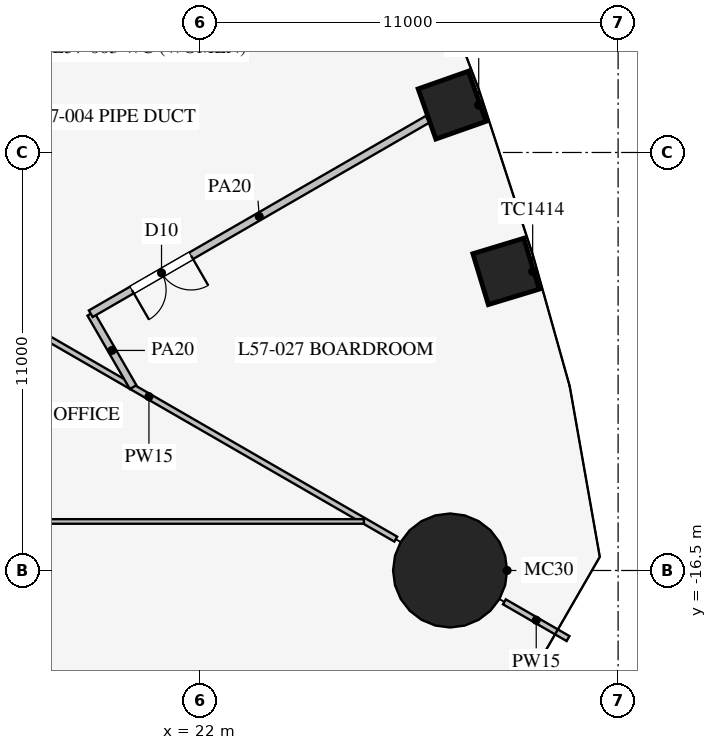
"""IFC4 building model, lengths in metres.
Left out: names, types, materials, properties, quantities, classifications, styles, units other than length and angle.
Written with IfcOpenShell. Run it as: python <this file> out.ifc"""

import sys

from ifc_helpers import new_model, si_unit, direction, frame, frame_2d, origin, origin_2d, place, context, subcontext, project, spatial, rectangle, circle, extrude, element, fill, save


model = new_model("IFC4")
c1 = context("Model", 3, precision=1e-05, world=origin(), true_north=direction((0.0, 1.0)))
c2 = subcontext(c1, "Body", "Model", "MODEL_VIEW")
j1 = project(units=[si_unit("LENGTHUNIT", "METRE"), si_unit("PLANEANGLEUNIT", "RADIAN")], contexts=[c1])
p1 = place(None, origin())
s1 = spatial("IfcSite", under=j1, at=p1, CompositionType="ELEMENT")
p2 = place(p1, origin())
s2 = spatial("IfcBuilding", under=s1, at=p2, CompositionType="ELEMENT")
p3 = place(p2, frame((0.0, 0.0, 248.5)))
s3 = spatial("IfcBuildingStorey", under=s2, at=p3, CompositionType="ELEMENT", Elevation=248.5)
for number, where, z_axis, x_axis in (
    (1, (30.052, -8.63, 0.0), (0.0, 0.0, 1.0), (-0.29, 0.957, 0.0)),
    (2, (28.632, -4.254, 0.0), (0.0, 0.0, 1.0), (-0.332, 0.943, 0.0)),
):
    element("IfcColumn", number, at=place(p3, frame(where, z_axis=z_axis, x_axis=x_axis)), inside=s3, PredefinedType="COLUMN", context=c2, shape_type="SweptSolid", body=[
        extrude(rectangle(XDim=1.4, YDim=1.4, at=origin_2d()), origin(), (0.0, 0.0, 1.0), 4.2),
    ])
p4 = place(p3, frame((28.579, -16.5, 0.0), z_axis=(0.0, 0.0, 1.0), x_axis=(1.0, 0.0, 0.0)))
e3 = element("IfcColumn", 3, at=p4, inside=s3, PredefinedType="COLUMN", context=c2, shape_type="SweptSolid", body=[
    extrude(circle(Radius=1.5, at=origin_2d()), origin(), (0.0, 0.0, 1.0), 4.2),
])
p5 = place(p3, frame((14.159, -8.175, 0.0), z_axis=(0.0, 0.0, 1.0), x_axis=(0.866027028085, -0.499997186618, 0.0)))
e4 = element("IfcWall", 4, at=p5, inside=s3, PredefinedType="PARTITIONING", context=c2, shape_type="SweptSolid", body=[
    extrude(rectangle(XDim=15.0, YDim=0.15, at=frame_2d((7.5, 0.0))), origin(), (0.0, 0.0, 1.0), 2.4),
])
p6 = place(p3, frame((30.008, -17.325, 0.0), z_axis=(0.0, 0.0, 1.0), x_axis=(0.866013246922, -0.500021055713, 0.0)))
e5 = element("IfcWall", 5, at=p6, inside=s3, PredefinedType="PARTITIONING", context=c2, shape_type="SweptSolid", body=[
    extrude(rectangle(XDim=1.935, YDim=0.15, at=frame_2d((0.967, 0.0))), origin(), (0.0, 0.0, 1.0), 2.4),
])
p7 = place(p3, frame((-26.312, -15.21, 0.0), z_axis=(0.0, 0.0, 1.0), x_axis=(1.0, 0.0, 0.0)))
e6 = element("IfcWall", 6, at=p7, inside=s3, PredefinedType="PARTITIONING", context=c2, shape_type="SweptSolid", body=[
    extrude(rectangle(XDim=52.624, YDim=0.12, at=frame_2d((26.312, 0.0))), origin(), (0.0, 0.0, 1.0), 2.9),
])
p8 = place(p7, frame((10.15, 0.0, 0.15)))
e7 = element("IfcOpeningElement", 7, at=p8, cuts=e6, PredefinedType="OPENING", context=c2, shape_type="SweptSolid", body=[
    extrude(rectangle(XDim=1.8, YDim=2.1, at=frame_2d((0.9, 1.05))), frame((0.0, 0.07, 0.0), z_axis=(0.0, -1.0, 0.0), x_axis=(1.0, 0.0, 0.0)), (0.0, 0.0, 1.0), 0.14),
])
p9 = place(p7, frame((40.65, 0.0, 0.15)))
e8 = element("IfcOpeningElement", 8, at=p9, cuts=e6, PredefinedType="OPENING", context=c2, shape_type="SweptSolid", body=[
    extrude(rectangle(XDim=1.8, YDim=2.1, at=frame_2d((0.9, 1.05))), frame((0.0, 0.07, 0.0), z_axis=(0.0, -1.0, 0.0), x_axis=(1.0, 0.0, 0.0)), (0.0, 0.0, 1.0), 0.14),
])
p10 = place(p3, frame((19.124, -9.743, 0.0), z_axis=(0.0, 0.0, 1.0), x_axis=(0.500047783504, -0.865997814208, 0.0)))
e9 = element("IfcWall", 9, at=p10, inside=s3, PredefinedType="PARTITIONING", context=c2, shape_type="SweptSolid", body=[
    extrude(rectangle(XDim=2.23, YDim=0.2, at=frame_2d((1.115, 0.0))), origin(), (0.0, 0.0, 1.0), 2.9),
])
p11 = place(p3, frame((19.124, -9.743, 0.0), z_axis=(0.0, 0.0, 1.0), x_axis=(0.866033076574, 0.499986710104, 0.0)))
e10 = element("IfcWall", 10, at=p11, inside=s3, PredefinedType="PARTITIONING", context=c2, shape_type="SweptSolid", body=[
    extrude(rectangle(XDim=10.237, YDim=0.2, at=frame_2d((5.118, 0.0))), origin(), (0.0, 0.0, 1.0), 2.8),
])
p12 = place(p11, frame((1.25, 0.0, 0.15)))
e11 = element("IfcOpeningElement", 11, at=p12, cuts=e10, PredefinedType="OPENING", context=c2, shape_type="SweptSolid", body=[
    extrude(rectangle(XDim=1.8, YDim=2.1, at=frame_2d((0.9, 1.05))), frame((0.0, 0.11, 0.0), z_axis=(0.0, -1.0, 0.0), x_axis=(1.0, 0.0, 0.0)), (0.0, 0.0, 1.0), 0.22),
])
p13 = place(p12, frame((1.8, 0.0, 0.0), z_axis=(0.0, 0.0, 1.0), x_axis=(-1.0, 0.0, 0.0)))
e12 = element("IfcDoor", 12, at=p13, inside=s3, OperationType="DOUBLE_DOOR_SINGLE_SWING", PredefinedType="DOOR", context=c2, shape_type="SweptSolid", body=[
    extrude(rectangle(XDim=1.8, YDim=2.1, at=frame_2d((0.9, 1.05))), frame((0.0, 0.025, 0.0), z_axis=(0.0, -1.0, 0.0), x_axis=(1.0, 0.0, 0.0)), (0.0, 0.0, 1.0), 0.05),
])
fill(e11, e12)
save(model, sys.argv[1])
